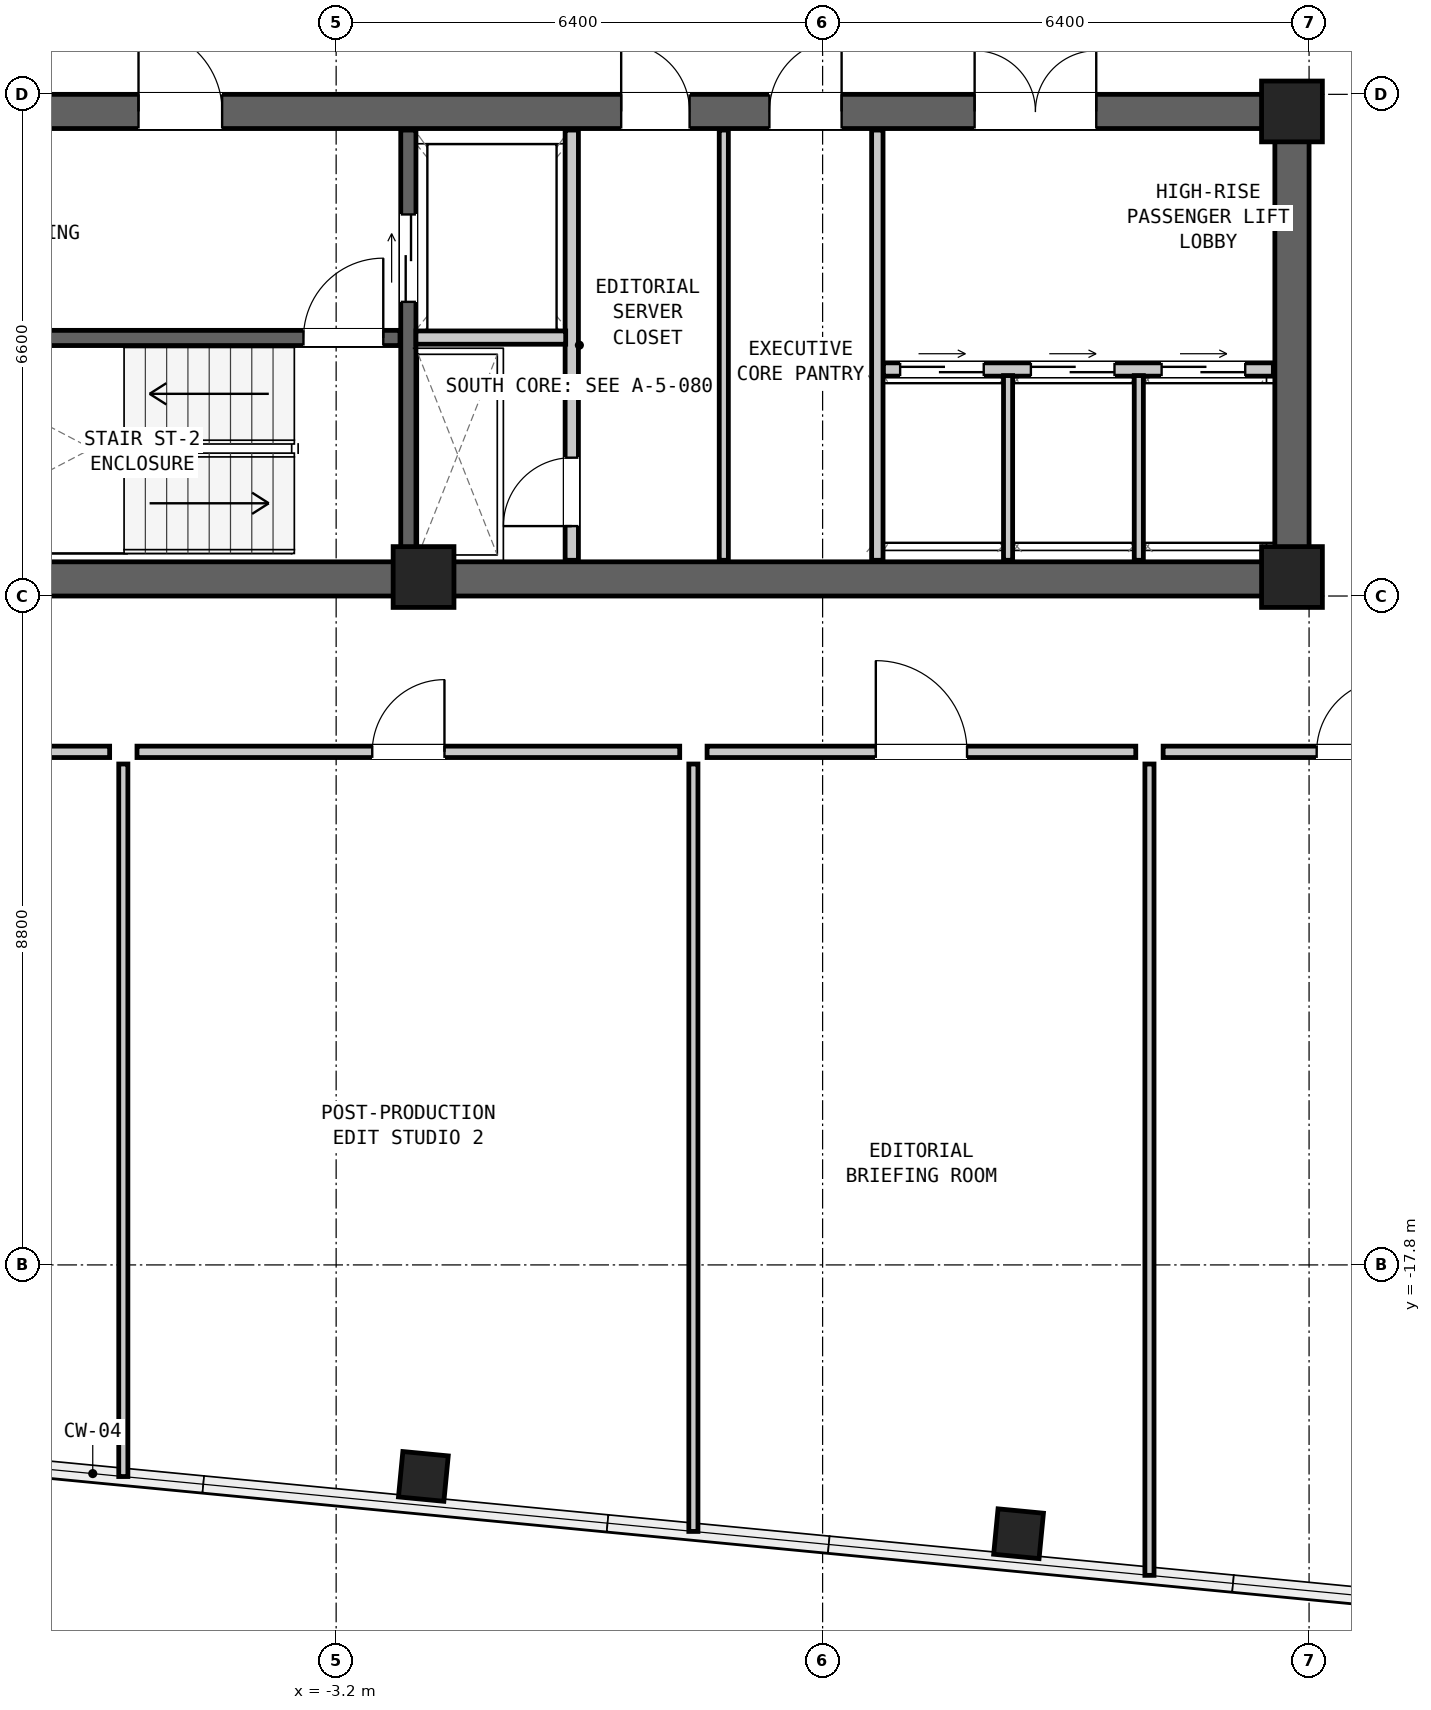
"""IFC4 building model, lengths in metres.
Left out: names, types, materials, properties, quantities, classifications, styles, units other than length and angle.
Written with IfcOpenShell. Run it as: python <this file> out.ifc"""

import sys

from ifc_helpers import new_model, si_unit, direction, frame, frame_2d, origin, origin_2d, place, context, subcontext, project, spatial, rectangle, hollow_rectangle, extrude, element, fill, save


model = new_model("IFC4")
c1 = context("Model", 3, precision=1e-05, world=origin(), true_north=direction((0.0, 1.0)))
c2 = subcontext(c1, "Body", "Model", "MODEL_VIEW")
j1 = project(units=[si_unit("LENGTHUNIT", "METRE"), si_unit("PLANEANGLEUNIT", "RADIAN")], contexts=[c1])
p1 = place(None, origin())
s1 = spatial("IfcSite", under=j1, at=p1, CompositionType="ELEMENT")
p2 = place(p1, origin())
s2 = spatial("IfcBuilding", under=s1, at=p2, CompositionType="ELEMENT")
p3 = place(p2, frame((0.0, 0.0, 261.15)))
s3 = spatial("IfcBuildingStorey", under=s2, at=p3, CompositionType="ELEMENT", Elevation=261.15)
p4 = place(p3, frame((-9.6, -8.775, 0.0), z_axis=(0.0, 0.0, 1.0), x_axis=(1.0, 0.0, 0.0)))
e1 = element("IfcWall", 1, at=p4, inside=s3, PredefinedType="SHEAR", context=c2, shape_type="SweptSolid", body=[
    extrude(rectangle(XDim=19.2, YDim=0.45, at=frame_2d((9.6, 0.0))), origin(), (0.0, 0.0, 1.0), 3.05),
])
p5 = place(p3, frame((-9.6, -2.625, 0.0), z_axis=(0.0, 0.0, 1.0), x_axis=(1.0, 0.0, 0.0)))
e2 = element("IfcWall", 2, at=p5, inside=s3, PredefinedType="SHEAR", context=c2, shape_type="SweptSolid", body=[
    extrude(rectangle(XDim=19.2, YDim=0.45, at=frame_2d((9.6, 0.0))), origin(), (0.0, 0.0, 1.0), 3.05),
])
p6 = place(p5, frame((3.8, 0.0, 0.0)))
e3 = element("IfcOpeningElement", 3, at=p6, cuts=e2, PredefinedType="OPENING", context=c2, shape_type="SweptSolid", body=[
    extrude(rectangle(XDim=1.1, YDim=2.08, at=frame_2d((0.55, 1.04))), frame((0.0, 0.237, 0.0), z_axis=(0.0, -1.0, 0.0), x_axis=(1.0, 0.0, 0.0)), (0.0, 0.0, 1.0), 0.474),
])
p7 = place(p5, frame((10.15, 0.0, 0.0)))
e4 = element("IfcOpeningElement", 4, at=p7, cuts=e2, PredefinedType="OPENING", context=c2, shape_type="SweptSolid", body=[
    extrude(rectangle(XDim=0.9, YDim=2.05, at=frame_2d((0.45, 1.025))), frame((0.0, 0.237, 0.0), z_axis=(0.0, -1.0, 0.0), x_axis=(1.0, 0.0, 0.0)), (0.0, 0.0, 1.0), 0.474),
])
p8 = place(p5, frame((12.1, 0.0, 0.0)))
e5 = element("IfcOpeningElement", 5, at=p8, cuts=e2, PredefinedType="OPENING", context=c2, shape_type="SweptSolid", body=[
    extrude(rectangle(XDim=0.95, YDim=2.1, at=frame_2d((0.475, 1.05))), frame((0.0, 0.237, 0.0), z_axis=(0.0, -1.0, 0.0), x_axis=(1.0, 0.0, 0.0)), (0.0, 0.0, 1.0), 0.474),
])
p9 = place(p5, frame((14.8, 0.0, 0.0)))
e6 = element("IfcOpeningElement", 6, at=p9, cuts=e2, PredefinedType="OPENING", context=c2, shape_type="SweptSolid", body=[
    extrude(rectangle(XDim=1.6, YDim=2.12, at=frame_2d((0.8, 1.06))), frame((0.0, 0.237, 0.0), z_axis=(0.0, -1.0, 0.0), x_axis=(1.0, 0.0, 0.0)), (0.0, 0.0, 1.0), 0.474),
])
p10 = place(p3, frame((9.375, -9.0, 0.0), z_axis=(0.0, 0.0, 1.0), x_axis=(0.0, 1.0, 0.0)))
e7 = element("IfcWall", 7, at=p10, inside=s3, PredefinedType="SHEAR", context=c2, shape_type="SweptSolid", body=[
    extrude(rectangle(XDim=6.6, YDim=0.45, at=frame_2d((3.3, 0.0))), origin(), (0.0, 0.0, 1.0), 3.05),
])
for number, where, z_axis, x_axis in (
    (8, (-2.052, -20.583, 0.0), (0.0, 0.0, 1.0), (0.995, -0.096, 0.0)),
    (9, (5.778, -21.336, 0.0), (0.0, 0.0, 1.0), (0.995, -0.096, 0.0)),
):
    element("IfcColumn", number, at=place(p3, frame(where, z_axis=z_axis, x_axis=x_axis)), inside=s3, PredefinedType="COLUMN", context=c2, shape_type="SweptSolid", body=[
        extrude(hollow_rectangle(XDim=0.6, YDim=0.6, WallThickness=0.04, at=origin_2d()), origin(), (0.0, 0.0, 1.0), 3.05),
    ])
for number, where, z_axis, x_axis in (
    (10, (9.375, -2.625, 0.0), (0.0, 0.0, 1.0), (1.0, 0.0, 0.0)),
    (11, (-2.05, -8.75, 0.0), (0.0, 0.0, 1.0), (1.0, 0.0, 0.0)),
    (12, (9.375, -8.75, 0.0), (0.0, 0.0, 1.0), (1.0, 0.0, 0.0)),
):
    element("IfcColumn", number, at=place(p3, frame(where, z_axis=z_axis, x_axis=x_axis)), inside=s3, PredefinedType="COLUMN", context=c2, shape_type="SweptSolid", body=[
        extrude(rectangle(XDim=0.8, YDim=0.8, at=origin_2d()), origin(), (0.0, 0.0, 1.0), 3.05),
    ])
p11 = place(p3, frame((-9.13, -5.605, 0.0), z_axis=(0.0, 0.0, 1.0), x_axis=(1.0, 0.0, 0.0)))
e13 = element("IfcWall", 13, at=p11, inside=s3, PredefinedType="SHEAR", context=c2, shape_type="SweptSolid", body=[
    extrude(rectangle(XDim=6.77, YDim=0.2, at=frame_2d((3.385, 0.0))), origin(), (0.0, 0.0, 1.0), 2.86),
])
p12 = place(p11, frame((5.5, 0.0, 0.0)))
e14 = element("IfcOpeningElement", 14, at=p12, cuts=e13, PredefinedType="OPENING", context=c2, shape_type="SweptSolid", body=[
    extrude(rectangle(XDim=1.05, YDim=2.08, at=frame_2d((0.525, 1.04))), frame((0.0, 0.112, 0.0), z_axis=(0.0, -1.0, 0.0), x_axis=(1.0, 0.0, 0.0)), (0.0, 0.0, 1.0), 0.224),
])
p13 = place(p3, frame((-2.25, -8.53, 0.0), z_axis=(0.0, 0.0, 1.0), x_axis=(0.0, 1.0, 0.0)))
e15 = element("IfcWall", 15, at=p13, inside=s3, PredefinedType="SHEAR", context=c2, shape_type="SweptSolid", body=[
    extrude(rectangle(XDim=5.66, YDim=0.2, at=frame_2d((2.83, 0.0))), origin(), (0.0, 0.0, 1.0), 2.86),
])
p14 = place(p13, frame((3.4, 0.0, 0.0)))
e16 = element("IfcOpeningElement", 16, at=p14, cuts=e15, PredefinedType="OPENING", context=c2, shape_type="SweptSolid", body=[
    extrude(rectangle(XDim=1.15, YDim=2.08, at=frame_2d((0.575, 1.04))), frame((0.0, 0.112, 0.0), z_axis=(0.0, -1.0, 0.0), x_axis=(1.0, 0.0, 0.0)), (0.0, 0.0, 1.0), 0.224),
])
p15 = place(p3, frame((-0.1, -8.53, 0.0), z_axis=(0.0, 0.0, 1.0), x_axis=(0.0, 1.0, 0.0)))
e17 = element("IfcWall", 17, at=p15, inside=s3, PredefinedType="PARTITIONING", context=c2, shape_type="SweptSolid", body=[
    extrude(rectangle(XDim=5.66, YDim=0.175, at=frame_2d((2.83, 0.0))), origin(), (0.0, 0.0, 1.0), 2.86),
])
p16 = place(p15, frame((0.45, 0.0, 0.0)))
e18 = element("IfcOpeningElement", 18, at=p16, cuts=e17, PredefinedType="OPENING", context=c2, shape_type="SweptSolid", body=[
    extrude(rectangle(XDim=0.9, YDim=2.05, at=frame_2d((0.45, 1.025))), frame((0.0, 0.1, 0.0), z_axis=(0.0, -1.0, 0.0), x_axis=(1.0, 0.0, 0.0)), (0.0, 0.0, 1.0), 0.199),
])
p17 = place(p3, frame((-2.15, -5.6, 0.0), z_axis=(0.0, 0.0, 1.0), x_axis=(1.0, 0.0, 0.0)))
e19 = element("IfcWall", 19, at=p17, inside=s3, PredefinedType="PARTITIONING", context=c2, shape_type="SweptSolid", body=[
    extrude(rectangle(XDim=1.97, YDim=0.175, at=frame_2d((0.985, 0.0))), origin(), (0.0, 0.0, 1.0), 2.86),
])
p18 = place(p3, frame((3.92, -8.53, 0.0), z_axis=(0.0, 0.0, 1.0), x_axis=(0.0, 1.0, 0.0)))
e20 = element("IfcWall", 20, at=p18, inside=s3, PredefinedType="PARTITIONING", context=c2, shape_type="SweptSolid", body=[
    extrude(rectangle(XDim=5.66, YDim=0.15, at=frame_2d((2.83, 0.0))), origin(), (0.0, 0.0, 1.0), 2.86),
])
p19 = place(p3, frame((1.9, -8.53, 0.0), z_axis=(0.0, 0.0, 1.0), x_axis=(0.0, 1.0, 0.0)))
e21 = element("IfcWall", 21, at=p19, inside=s3, PredefinedType="PARTITIONING", context=c2, shape_type="SweptSolid", body=[
    extrude(rectangle(XDim=5.66, YDim=0.12, at=frame_2d((2.83, 0.0))), origin(), (0.0, 0.0, 1.0), 2.86),
])
p20 = place(p3, frame((4.0, -6.02, 0.0), z_axis=(0.0, 0.0, 1.0), x_axis=(1.0, 0.0, 0.0)))
e22 = element("IfcWall", 22, at=p20, inside=s3, PredefinedType="PARTITIONING", context=c2, shape_type="SweptSolid", body=[
    extrude(rectangle(XDim=5.13, YDim=0.175, at=frame_2d((2.565, 0.0))), origin(), (0.0, 0.0, 1.0), 2.86),
])
p21 = place(p20, frame((0.22, 0.0, 0.0)))
e23 = element("IfcOpeningElement", 23, at=p21, cuts=e22, PredefinedType="OPENING", context=c2, shape_type="SweptSolid", body=[
    extrude(rectangle(XDim=1.1, YDim=2.06, at=frame_2d((0.55, 1.03))), frame((0.0, 0.1, 0.0), z_axis=(0.0, -1.0, 0.0), x_axis=(1.0, 0.0, 0.0)), (0.0, 0.0, 1.0), 0.199),
])
p22 = place(p20, frame((1.94, 0.0, 0.0)))
e24 = element("IfcOpeningElement", 24, at=p22, cuts=e22, PredefinedType="OPENING", context=c2, shape_type="SweptSolid", body=[
    extrude(rectangle(XDim=1.1, YDim=2.06, at=frame_2d((0.55, 1.03))), frame((0.0, 0.1, 0.0), z_axis=(0.0, -1.0, 0.0), x_axis=(1.0, 0.0, 0.0)), (0.0, 0.0, 1.0), 0.199),
])
p23 = place(p20, frame((3.66, 0.0, 0.0)))
e25 = element("IfcOpeningElement", 25, at=p23, cuts=e22, PredefinedType="OPENING", context=c2, shape_type="SweptSolid", body=[
    extrude(rectangle(XDim=1.1, YDim=2.06, at=frame_2d((0.55, 1.03))), frame((0.0, 0.1, 0.0), z_axis=(0.0, -1.0, 0.0), x_axis=(1.0, 0.0, 0.0)), (0.0, 0.0, 1.0), 0.199),
])
for number, where, z_axis, x_axis in (
    (26, (5.64, -8.53, 0.0), (0.0, 0.0, 1.0), (0.0, 1.0, 0.0)),
    (27, (7.36, -8.53, 0.0), (0.0, 0.0, 1.0), (0.0, 1.0, 0.0)),
):
    element("IfcWall", number, at=place(p3, frame(where, z_axis=z_axis, x_axis=x_axis)), inside=s3, PredefinedType="PARTITIONING", context=c2, shape_type="SweptSolid", body=[
        extrude(rectangle(XDim=2.43, YDim=0.12, at=frame_2d((1.215, 0.0))), origin(), (0.0, 0.0, 1.0), 2.86),
    ])
p24 = place(p3, frame((-6.0, -20.584, 0.0), z_axis=(0.0, 0.0, 1.0), x_axis=(0.0, 1.0, 0.0)))
e28 = element("IfcWall", 28, at=p24, inside=s3, PredefinedType="PARTITIONING", context=c2, shape_type="SweptSolid", body=[
    extrude(rectangle(XDim=9.374, YDim=0.12, at=frame_2d((4.687, 0.0))), origin(), (0.0, 0.0, 1.0), 2.381),
])
p25 = place(p3, frame((1.5, -21.306, 0.0), z_axis=(0.0, 0.0, 1.0), x_axis=(0.0, 1.0, 0.0)))
e29 = element("IfcWall", 29, at=p25, inside=s3, PredefinedType="PARTITIONING", context=c2, shape_type="SweptSolid", body=[
    extrude(rectangle(XDim=10.096, YDim=0.12, at=frame_2d((5.048, 0.0))), origin(), (0.0, 0.0, 1.0), 2.86),
])
p26 = place(p3, frame((7.5, -21.884, 0.0), z_axis=(0.0, 0.0, 1.0), x_axis=(0.0, 1.0, 0.0)))
e30 = element("IfcWall", 30, at=p26, inside=s3, PredefinedType="PARTITIONING", context=c2, shape_type="SweptSolid", body=[
    extrude(rectangle(XDim=10.674, YDim=0.12, at=frame_2d((5.337, 0.0))), origin(), (0.0, 0.0, 1.0), 2.86),
])
p27 = place(p3, frame((-11.12, -11.05, 0.0), z_axis=(0.0, 0.0, 1.0), x_axis=(1.0, 0.0, 0.0)))
e31 = element("IfcWall", 31, at=p27, inside=s3, PredefinedType="PARTITIONING", context=c2, shape_type="SweptSolid", body=[
    extrude(rectangle(XDim=4.94, YDim=0.15, at=frame_2d((2.47, 0.0))), origin(), (0.0, 0.0, 1.0), 2.86),
])
p28 = place(p27, frame((2.195, 0.0, 0.0)))
e32 = element("IfcOpeningElement", 32, at=p28, cuts=e31, PredefinedType="OPENING", context=c2, shape_type="SweptSolid", body=[
    extrude(rectangle(XDim=0.95, YDim=2.1, at=frame_2d((0.475, 1.05))), frame((0.0, 0.087, 0.0), z_axis=(0.0, -1.0, 0.0), x_axis=(1.0, 0.0, 0.0)), (0.0, 0.0, 1.0), 0.174),
])
p29 = place(p3, frame((-5.82, -11.05, 0.0), z_axis=(0.0, 0.0, 1.0), x_axis=(1.0, 0.0, 0.0)))
e33 = element("IfcWall", 33, at=p29, inside=s3, PredefinedType="PARTITIONING", context=c2, shape_type="SweptSolid", body=[
    extrude(rectangle(XDim=7.14, YDim=0.15, at=frame_2d((3.57, 0.0))), origin(), (0.0, 0.0, 1.0), 2.86),
])
p30 = place(p29, frame((3.095, 0.0, 0.0)))
e34 = element("IfcOpeningElement", 34, at=p30, cuts=e33, PredefinedType="OPENING", context=c2, shape_type="SweptSolid", body=[
    extrude(rectangle(XDim=0.95, YDim=2.1, at=frame_2d((0.475, 1.05))), frame((0.0, 0.087, 0.0), z_axis=(0.0, -1.0, 0.0), x_axis=(1.0, 0.0, 0.0)), (0.0, 0.0, 1.0), 0.174),
])
p31 = place(p3, frame((1.68, -11.05, 0.0), z_axis=(0.0, 0.0, 1.0), x_axis=(1.0, 0.0, 0.0)))
e35 = element("IfcWall", 35, at=p31, inside=s3, PredefinedType="PARTITIONING", context=c2, shape_type="SweptSolid", body=[
    extrude(rectangle(XDim=5.64, YDim=0.15, at=frame_2d((2.82, 0.0))), origin(), (0.0, 0.0, 1.0), 2.86),
])
p32 = place(p31, frame((2.22, 0.0, 0.0)))
e36 = element("IfcOpeningElement", 36, at=p32, cuts=e35, PredefinedType="OPENING", context=c2, shape_type="SweptSolid", body=[
    extrude(rectangle(XDim=1.2, YDim=2.1, at=frame_2d((0.6, 1.05))), frame((0.0, 0.087, 0.0), z_axis=(0.0, -1.0, 0.0), x_axis=(1.0, 0.0, 0.0)), (0.0, 0.0, 1.0), 0.174),
])
p33 = place(p3, frame((7.68, -11.05, 0.0), z_axis=(0.0, 0.0, 1.0), x_axis=(1.0, 0.0, 0.0)))
e37 = element("IfcWall", 37, at=p33, inside=s3, PredefinedType="PARTITIONING", context=c2, shape_type="SweptSolid", body=[
    extrude(rectangle(XDim=3.79, YDim=0.15, at=frame_2d((1.895, 0.0))), origin(), (0.0, 0.0, 1.0), 2.86),
])
p34 = place(p33, frame((2.02, 0.0, 0.0)))
e38 = element("IfcOpeningElement", 38, at=p34, cuts=e37, PredefinedType="OPENING", context=c2, shape_type="SweptSolid", body=[
    extrude(rectangle(XDim=0.95, YDim=2.1, at=frame_2d((0.475, 1.05))), frame((0.0, 0.087, 0.0), z_axis=(0.0, -1.0, 0.0), x_axis=(1.0, 0.0, 0.0)), (0.0, 0.0, 1.0), 0.174),
])
p35 = place(p12, origin())
e39 = element("IfcDoor", 39, at=p35, inside=s3, OperationType="SINGLE_SWING_RIGHT", PredefinedType="DOOR", context=c2, shape_type="SweptSolid", body=[
    extrude(rectangle(XDim=1.05, YDim=2.08, at=frame_2d((0.525, 1.04))), frame((0.0, 0.025, 0.0), z_axis=(0.0, -1.0, 0.0), x_axis=(1.0, 0.0, 0.0)), (0.0, 0.0, 1.0), 0.05),
])
fill(e14, e39)
p36 = place(p6, origin())
e40 = element("IfcDoor", 40, at=p36, inside=s3, OperationType="SINGLE_SWING_LEFT", PredefinedType="DOOR", context=c2, shape_type="SweptSolid", body=[
    extrude(rectangle(XDim=1.1, YDim=2.08, at=frame_2d((0.55, 1.04))), frame((0.0, 0.025, 0.0), z_axis=(0.0, -1.0, 0.0), x_axis=(1.0, 0.0, 0.0)), (0.0, 0.0, 1.0), 0.05),
])
fill(e3, e40)
p37 = place(p14, origin())
e41 = element("IfcDoor", 41, at=p37, inside=s3, OperationType="DOUBLE_DOOR_SLIDING", PredefinedType="DOOR", context=c2, shape_type="SweptSolid", body=[
    extrude(rectangle(XDim=1.15, YDim=2.08, at=frame_2d((0.575, 1.04))), frame((0.0, 0.025, 0.0), z_axis=(0.0, -1.0, 0.0), x_axis=(1.0, 0.0, 0.0)), (0.0, 0.0, 1.0), 0.05),
])
fill(e16, e41)
p38 = place(p16, origin())
e42 = element("IfcDoor", 42, at=p38, inside=s3, OperationType="SINGLE_SWING_LEFT", PredefinedType="DOOR", context=c2, shape_type="SweptSolid", body=[
    extrude(rectangle(XDim=0.9, YDim=2.05, at=frame_2d((0.45, 1.025))), frame((0.0, 0.025, 0.0), z_axis=(0.0, -1.0, 0.0), x_axis=(1.0, 0.0, 0.0)), (0.0, 0.0, 1.0), 0.05),
])
fill(e18, e42)
p39 = place(p7, origin())
e43 = element("IfcDoor", 43, at=p39, inside=s3, OperationType="SINGLE_SWING_LEFT", PredefinedType="DOOR", context=c2, shape_type="SweptSolid", body=[
    extrude(rectangle(XDim=0.9, YDim=2.05, at=frame_2d((0.45, 1.025))), frame((0.0, 0.025, 0.0), z_axis=(0.0, -1.0, 0.0), x_axis=(1.0, 0.0, 0.0)), (0.0, 0.0, 1.0), 0.05),
])
fill(e4, e43)
p40 = place(p8, origin())
e44 = element("IfcDoor", 44, at=p40, inside=s3, OperationType="SINGLE_SWING_RIGHT", PredefinedType="DOOR", context=c2, shape_type="SweptSolid", body=[
    extrude(rectangle(XDim=0.95, YDim=2.1, at=frame_2d((0.475, 1.05))), frame((0.0, 0.025, 0.0), z_axis=(0.0, -1.0, 0.0), x_axis=(1.0, 0.0, 0.0)), (0.0, 0.0, 1.0), 0.05),
])
fill(e5, e44)
p41 = place(p21, origin())
e45 = element("IfcDoor", 45, at=p41, inside=s3, OperationType="DOUBLE_DOOR_SLIDING", PredefinedType="DOOR", context=c2, shape_type="SweptSolid", body=[
    extrude(rectangle(XDim=1.1, YDim=2.06, at=frame_2d((0.55, 1.03))), frame((0.0, 0.025, 0.0), z_axis=(0.0, -1.0, 0.0), x_axis=(1.0, 0.0, 0.0)), (0.0, 0.0, 1.0), 0.05),
])
fill(e23, e45)
p42 = place(p22, origin())
e46 = element("IfcDoor", 46, at=p42, inside=s3, OperationType="DOUBLE_DOOR_SLIDING", PredefinedType="DOOR", context=c2, shape_type="SweptSolid", body=[
    extrude(rectangle(XDim=1.1, YDim=2.06, at=frame_2d((0.55, 1.03))), frame((0.0, 0.025, 0.0), z_axis=(0.0, -1.0, 0.0), x_axis=(1.0, 0.0, 0.0)), (0.0, 0.0, 1.0), 0.05),
])
fill(e24, e46)
p43 = place(p23, origin())
e47 = element("IfcDoor", 47, at=p43, inside=s3, OperationType="DOUBLE_DOOR_SLIDING", PredefinedType="DOOR", context=c2, shape_type="SweptSolid", body=[
    extrude(rectangle(XDim=1.1, YDim=2.06, at=frame_2d((0.55, 1.03))), frame((0.0, 0.025, 0.0), z_axis=(0.0, -1.0, 0.0), x_axis=(1.0, 0.0, 0.0)), (0.0, 0.0, 1.0), 0.05),
])
fill(e25, e47)
p44 = place(p9, origin())
e48 = element("IfcDoor", 48, at=p44, inside=s3, OperationType="DOUBLE_DOOR_SINGLE_SWING", PredefinedType="DOOR", context=c2, shape_type="SweptSolid", body=[
    extrude(rectangle(XDim=1.6, YDim=2.12, at=frame_2d((0.8, 1.06))), frame((0.0, 0.025, 0.0), z_axis=(0.0, -1.0, 0.0), x_axis=(1.0, 0.0, 0.0)), (0.0, 0.0, 1.0), 0.05),
])
fill(e6, e48)
p45 = place(p30, origin())
e49 = element("IfcDoor", 49, at=p45, inside=s3, OperationType="SINGLE_SWING_RIGHT", PredefinedType="DOOR", context=c2, shape_type="SweptSolid", body=[
    extrude(rectangle(XDim=0.95, YDim=2.1, at=frame_2d((0.475, 1.05))), frame((0.0, 0.025, 0.0), z_axis=(0.0, -1.0, 0.0), x_axis=(1.0, 0.0, 0.0)), (0.0, 0.0, 1.0), 0.05),
])
fill(e34, e49)
p46 = place(p32, origin())
e50 = element("IfcDoor", 50, at=p46, inside=s3, OperationType="SINGLE_SWING_LEFT", PredefinedType="DOOR", context=c2, shape_type="SweptSolid", body=[
    extrude(rectangle(XDim=1.2, YDim=2.1, at=frame_2d((0.6, 1.05))), frame((0.0, 0.025, 0.0), z_axis=(0.0, -1.0, 0.0), x_axis=(1.0, 0.0, 0.0)), (0.0, 0.0, 1.0), 0.05),
])
fill(e36, e50)
p47 = place(p34, origin())
e51 = element("IfcDoor", 51, at=p47, inside=s3, OperationType="SINGLE_SWING_RIGHT", PredefinedType="DOOR", context=c2, shape_type="SweptSolid", body=[
    extrude(rectangle(XDim=0.95, YDim=2.1, at=frame_2d((0.475, 1.05))), frame((0.0, 0.025, 0.0), z_axis=(0.0, -1.0, 0.0), x_axis=(1.0, 0.0, 0.0)), (0.0, 0.0, 1.0), 0.05),
])
fill(e38, e51)
save(model, sys.argv[1])
